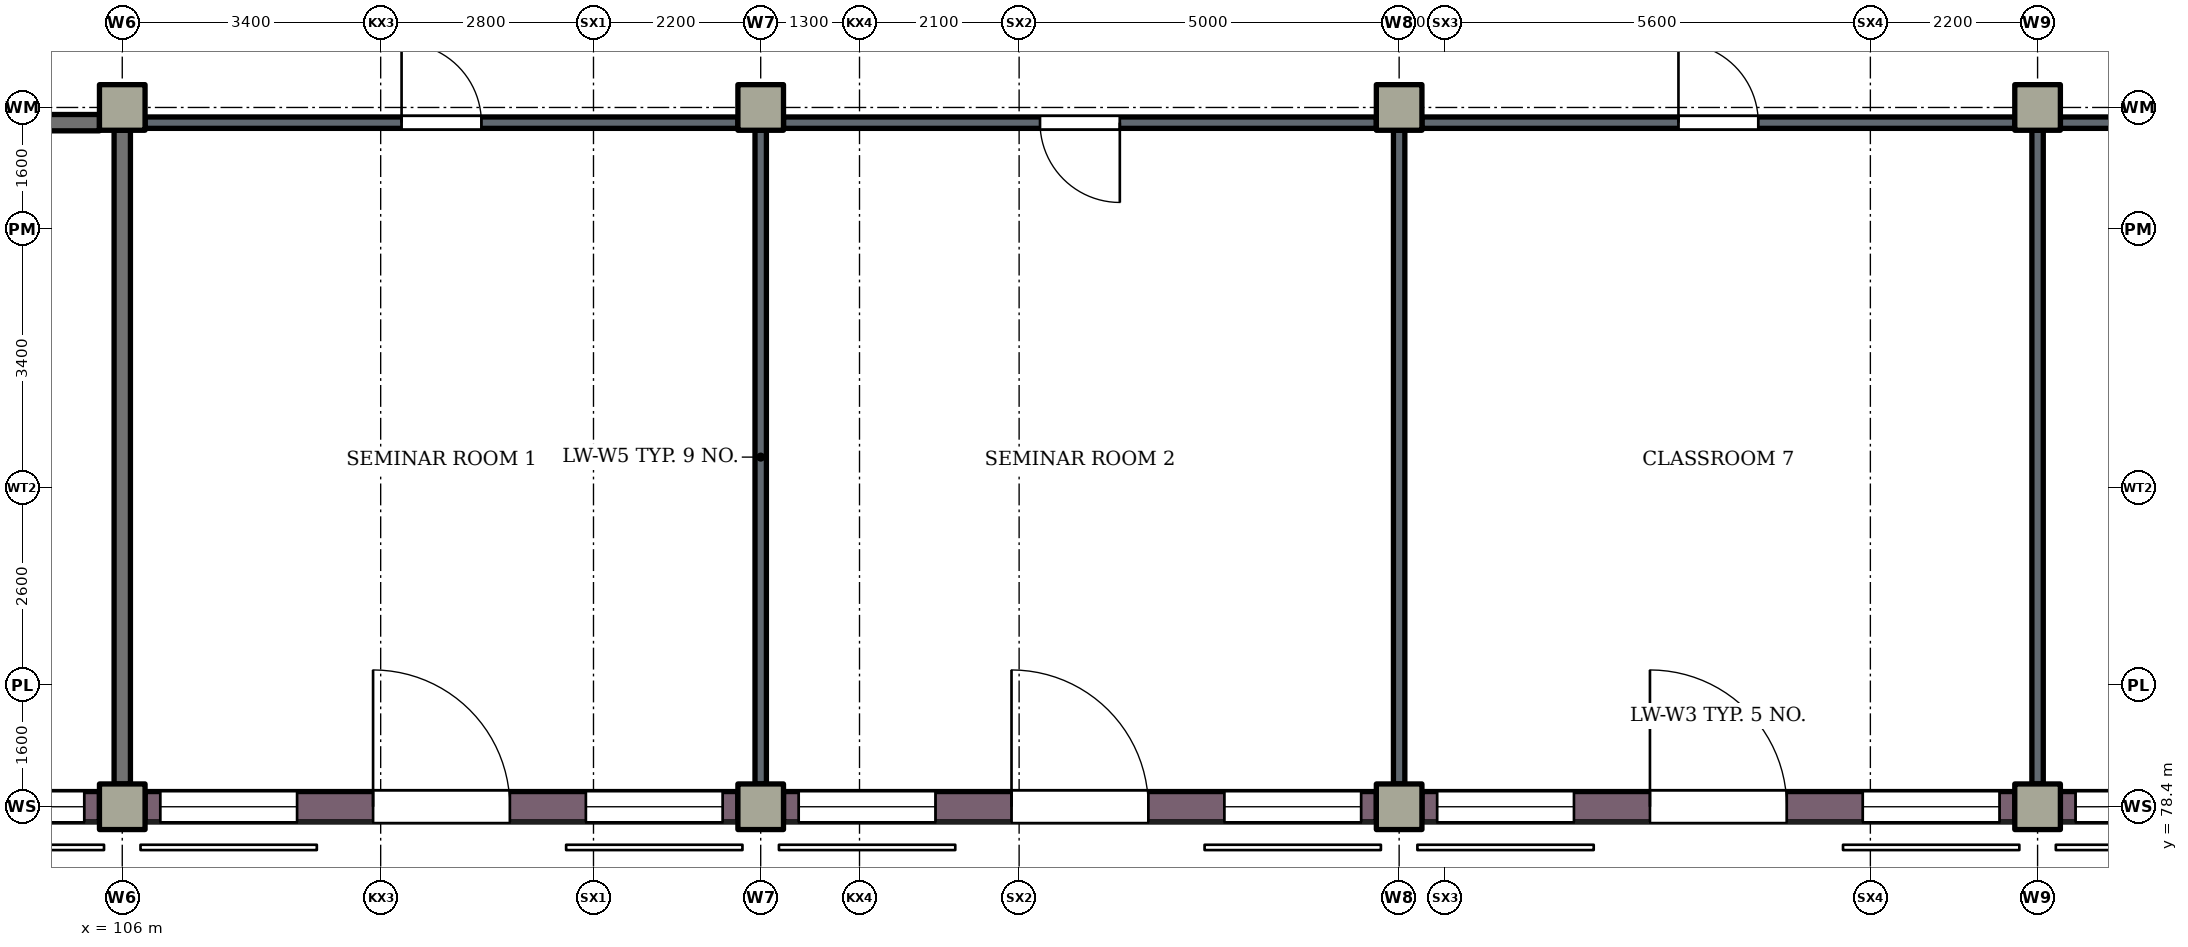
"""IFC4 building model, lengths in metres.
Left out: names, types, materials, properties, quantities, classifications, styles, units other than length and angle.
Written with IfcOpenShell. Run it as: python <this file> out.ifc"""

import sys

from ifc_helpers import new_model, si_unit, direction, frame, frame_2d, origin, origin_2d, place, context, subcontext, project, spatial, rectangle, extrude, element, fill, save


model = new_model("IFC4")
c1 = context("Model", 3, precision=1e-05, world=origin(), true_north=direction((0.0, 1.0)))
c2 = subcontext(c1, "Body", "Model", "MODEL_VIEW")
j1 = project(units=[si_unit("LENGTHUNIT", "METRE"), si_unit("PLANEANGLEUNIT", "RADIAN")], contexts=[c1])
p1 = place(None, origin())
s1 = spatial("IfcSite", under=j1, at=p1, CompositionType="ELEMENT")
p2 = place(p1, origin())
s2 = spatial("IfcBuilding", under=s1, at=p2, CompositionType="ELEMENT")
p3 = place(p2, frame((0.0, 0.0, 8.4)))
s3 = spatial("IfcBuildingStorey", under=s2, at=p3, CompositionType="ELEMENT", Elevation=8.4)
for number, where, z_axis, x_axis in (
    (1, (106.0, 87.6, 0.0), (0.0, 0.0, 1.0), (1.0, 0.0, 0.0)),
    (2, (114.4, 87.6, 0.0), (0.0, 0.0, 1.0), (1.0, 0.0, 0.0)),
    (3, (122.8, 87.6, 0.0), (0.0, 0.0, 1.0), (1.0, 0.0, 0.0)),
    (4, (131.2, 87.6, 0.0), (0.0, 0.0, 1.0), (1.0, 0.0, 0.0)),
    (5, (106.0, 78.4, 0.0), (0.0, 0.0, 1.0), (1.0, 0.0, 0.0)),
    (6, (114.4, 78.4, 0.0), (0.0, 0.0, 1.0), (1.0, 0.0, 0.0)),
    (7, (122.8, 78.4, 0.0), (0.0, 0.0, 1.0), (1.0, 0.0, 0.0)),
    (8, (131.2, 78.4, 0.0), (0.0, 0.0, 1.0), (1.0, 0.0, 0.0)),
):
    element("IfcColumn", number, at=place(p3, frame(where, z_axis=z_axis, x_axis=x_axis)), inside=s3, PredefinedType="COLUMN", context=c2, shape_type="SweptSolid", body=[
        extrude(rectangle(XDim=0.6, YDim=0.6, at=origin_2d()), origin(), (0.0, 0.0, 1.0), 4.2),
    ])
p4 = place(p3, frame((97.9, 78.4, 0.0), z_axis=(0.0, 0.0, 1.0), x_axis=(1.0, 0.0, 0.0)))
e9 = element("IfcWall", 9, at=p4, inside=s3, PredefinedType="SOLIDWALL", context=c2, shape_type="SweptSolid", body=[
    extrude(rectangle(XDim=7.8, YDim=0.4, at=frame_2d((3.9, 0.0))), origin(), (0.0, 0.0, 1.0), 3.32),
])
p5 = place(p4, frame((3.0, 0.0, 0.0)))
e10 = element("IfcOpeningElement", 10, at=p5, cuts=e9, PredefinedType="OPENING", context=c2, shape_type="SweptSolid", body=[
    extrude(rectangle(XDim=1.8, YDim=2.4, at=frame_2d((0.9, 1.2))), frame((0.0, 0.21, 0.0), z_axis=(0.0, -1.0, 0.0), x_axis=(1.0, 0.0, 0.0)), (0.0, 0.0, 1.0), 0.42),
])
p6 = place(p4, frame((0.2, 0.0, 0.9)))
e11 = element("IfcOpeningElement", 11, at=p6, cuts=e9, PredefinedType="OPENING", context=c2, shape_type="SweptSolid", body=[
    extrude(rectangle(XDim=1.8, YDim=1.9, at=frame_2d((0.9, 0.95))), frame((0.0, 0.21, 0.0), z_axis=(0.0, -1.0, 0.0), x_axis=(1.0, 0.0, 0.0)), (0.0, 0.0, 1.0), 0.42),
])
p7 = place(p4, frame((5.8, 0.0, 0.9)))
e12 = element("IfcOpeningElement", 12, at=p7, cuts=e9, PredefinedType="OPENING", context=c2, shape_type="SweptSolid", body=[
    extrude(rectangle(XDim=1.8, YDim=1.9, at=frame_2d((0.9, 0.95))), frame((0.0, 0.21, 0.0), z_axis=(0.0, -1.0, 0.0), x_axis=(1.0, 0.0, 0.0)), (0.0, 0.0, 1.0), 0.42),
])
p8 = place(p3, frame((106.3, 78.4, 0.0), z_axis=(0.0, 0.0, 1.0), x_axis=(1.0, 0.0, 0.0)))
e13 = element("IfcWall", 13, at=p8, inside=s3, PredefinedType="SOLIDWALL", context=c2, shape_type="SweptSolid", body=[
    extrude(rectangle(XDim=7.8, YDim=0.4, at=frame_2d((3.9, 0.0))), origin(), (0.0, 0.0, 1.0), 3.32),
])
p9 = place(p8, frame((3.0, 0.0, 0.0)))
e14 = element("IfcOpeningElement", 14, at=p9, cuts=e13, PredefinedType="OPENING", context=c2, shape_type="SweptSolid", body=[
    extrude(rectangle(XDim=1.8, YDim=2.4, at=frame_2d((0.9, 1.2))), frame((0.0, 0.21, 0.0), z_axis=(0.0, -1.0, 0.0), x_axis=(1.0, 0.0, 0.0)), (0.0, 0.0, 1.0), 0.42),
])
p10 = place(p8, frame((0.2, 0.0, 0.9)))
e15 = element("IfcOpeningElement", 15, at=p10, cuts=e13, PredefinedType="OPENING", context=c2, shape_type="SweptSolid", body=[
    extrude(rectangle(XDim=1.8, YDim=1.9, at=frame_2d((0.9, 0.95))), frame((0.0, 0.21, 0.0), z_axis=(0.0, -1.0, 0.0), x_axis=(1.0, 0.0, 0.0)), (0.0, 0.0, 1.0), 0.42),
])
p11 = place(p8, frame((5.8, 0.0, 0.9)))
e16 = element("IfcOpeningElement", 16, at=p11, cuts=e13, PredefinedType="OPENING", context=c2, shape_type="SweptSolid", body=[
    extrude(rectangle(XDim=1.8, YDim=1.9, at=frame_2d((0.9, 0.95))), frame((0.0, 0.21, 0.0), z_axis=(0.0, -1.0, 0.0), x_axis=(1.0, 0.0, 0.0)), (0.0, 0.0, 1.0), 0.42),
])
p12 = place(p3, frame((114.7, 78.4, 0.0), z_axis=(0.0, 0.0, 1.0), x_axis=(1.0, 0.0, 0.0)))
e17 = element("IfcWall", 17, at=p12, inside=s3, PredefinedType="SOLIDWALL", context=c2, shape_type="SweptSolid", body=[
    extrude(rectangle(XDim=7.8, YDim=0.4, at=frame_2d((3.9, 0.0))), origin(), (0.0, 0.0, 1.0), 3.32),
])
p13 = place(p12, frame((3.0, 0.0, 0.0)))
e18 = element("IfcOpeningElement", 18, at=p13, cuts=e17, PredefinedType="OPENING", context=c2, shape_type="SweptSolid", body=[
    extrude(rectangle(XDim=1.8, YDim=2.4, at=frame_2d((0.9, 1.2))), frame((0.0, 0.21, 0.0), z_axis=(0.0, -1.0, 0.0), x_axis=(1.0, 0.0, 0.0)), (0.0, 0.0, 1.0), 0.42),
])
p14 = place(p12, frame((0.2, 0.0, 0.9)))
e19 = element("IfcOpeningElement", 19, at=p14, cuts=e17, PredefinedType="OPENING", context=c2, shape_type="SweptSolid", body=[
    extrude(rectangle(XDim=1.8, YDim=1.9, at=frame_2d((0.9, 0.95))), frame((0.0, 0.21, 0.0), z_axis=(0.0, -1.0, 0.0), x_axis=(1.0, 0.0, 0.0)), (0.0, 0.0, 1.0), 0.42),
])
p15 = place(p12, frame((5.8, 0.0, 0.9)))
e20 = element("IfcOpeningElement", 20, at=p15, cuts=e17, PredefinedType="OPENING", context=c2, shape_type="SweptSolid", body=[
    extrude(rectangle(XDim=1.8, YDim=1.9, at=frame_2d((0.9, 0.95))), frame((0.0, 0.21, 0.0), z_axis=(0.0, -1.0, 0.0), x_axis=(1.0, 0.0, 0.0)), (0.0, 0.0, 1.0), 0.42),
])
p16 = place(p3, frame((123.1, 78.4, 0.0), z_axis=(0.0, 0.0, 1.0), x_axis=(1.0, 0.0, 0.0)))
e21 = element("IfcWall", 21, at=p16, inside=s3, PredefinedType="SOLIDWALL", context=c2, shape_type="SweptSolid", body=[
    extrude(rectangle(XDim=7.8, YDim=0.4, at=frame_2d((3.9, 0.0))), origin(), (0.0, 0.0, 1.0), 3.32),
])
p17 = place(p16, frame((3.0, 0.0, 0.0)))
e22 = element("IfcOpeningElement", 22, at=p17, cuts=e21, PredefinedType="OPENING", context=c2, shape_type="SweptSolid", body=[
    extrude(rectangle(XDim=1.8, YDim=2.4, at=frame_2d((0.9, 1.2))), frame((0.0, 0.21, 0.0), z_axis=(0.0, -1.0, 0.0), x_axis=(1.0, 0.0, 0.0)), (0.0, 0.0, 1.0), 0.42),
])
p18 = place(p16, frame((0.2, 0.0, 0.9)))
e23 = element("IfcOpeningElement", 23, at=p18, cuts=e21, PredefinedType="OPENING", context=c2, shape_type="SweptSolid", body=[
    extrude(rectangle(XDim=1.8, YDim=1.9, at=frame_2d((0.9, 0.95))), frame((0.0, 0.21, 0.0), z_axis=(0.0, -1.0, 0.0), x_axis=(1.0, 0.0, 0.0)), (0.0, 0.0, 1.0), 0.42),
])
p19 = place(p16, frame((5.8, 0.0, 0.9)))
e24 = element("IfcOpeningElement", 24, at=p19, cuts=e21, PredefinedType="OPENING", context=c2, shape_type="SweptSolid", body=[
    extrude(rectangle(XDim=1.8, YDim=1.9, at=frame_2d((0.9, 0.95))), frame((0.0, 0.21, 0.0), z_axis=(0.0, -1.0, 0.0), x_axis=(1.0, 0.0, 0.0)), (0.0, 0.0, 1.0), 0.42),
])
p20 = place(p3, frame((131.5, 78.4, 0.0), z_axis=(0.0, 0.0, 1.0), x_axis=(1.0, 0.0, 0.0)))
e25 = element("IfcWall", 25, at=p20, inside=s3, PredefinedType="SOLIDWALL", context=c2, shape_type="SweptSolid", body=[
    extrude(rectangle(XDim=7.8, YDim=0.4, at=frame_2d((3.9, 0.0))), origin(), (0.0, 0.0, 1.0), 3.32),
])
p21 = place(p20, frame((3.0, 0.0, 0.0)))
e26 = element("IfcOpeningElement", 26, at=p21, cuts=e25, PredefinedType="OPENING", context=c2, shape_type="SweptSolid", body=[
    extrude(rectangle(XDim=1.8, YDim=2.4, at=frame_2d((0.9, 1.2))), frame((0.0, 0.21, 0.0), z_axis=(0.0, -1.0, 0.0), x_axis=(1.0, 0.0, 0.0)), (0.0, 0.0, 1.0), 0.42),
])
p22 = place(p20, frame((0.2, 0.0, 0.9)))
e27 = element("IfcOpeningElement", 27, at=p22, cuts=e25, PredefinedType="OPENING", context=c2, shape_type="SweptSolid", body=[
    extrude(rectangle(XDim=1.8, YDim=1.9, at=frame_2d((0.9, 0.95))), frame((0.0, 0.21, 0.0), z_axis=(0.0, -1.0, 0.0), x_axis=(1.0, 0.0, 0.0)), (0.0, 0.0, 1.0), 0.42),
])
p23 = place(p20, frame((5.8, 0.0, 0.9)))
e28 = element("IfcOpeningElement", 28, at=p23, cuts=e25, PredefinedType="OPENING", context=c2, shape_type="SweptSolid", body=[
    extrude(rectangle(XDim=1.8, YDim=1.9, at=frame_2d((0.9, 0.95))), frame((0.0, 0.21, 0.0), z_axis=(0.0, -1.0, 0.0), x_axis=(1.0, 0.0, 0.0)), (0.0, 0.0, 1.0), 0.42),
])
p24 = place(p3, frame((97.9, 87.4, 0.0), z_axis=(0.0, 0.0, 1.0), x_axis=(1.0, 0.0, 0.0)))
e29 = element("IfcWall", 29, at=p24, inside=s3, PredefinedType="PARTITIONING", context=c2, shape_type="SweptSolid", body=[
    extrude(rectangle(XDim=7.8, YDim=0.215, at=frame_2d((3.9, 0.0))), origin(), (0.0, 0.0, 1.0), 3.12),
])
p25 = place(p24, frame((3.375, 0.0, 0.0)))
e30 = element("IfcOpeningElement", 30, at=p25, cuts=e29, PredefinedType="OPENING", context=c2, shape_type="SweptSolid", body=[
    extrude(rectangle(XDim=1.05, YDim=2.1, at=frame_2d((0.525, 1.05))), frame((0.0, 0.117, 0.0), z_axis=(0.0, -1.0, 0.0), x_axis=(1.0, 0.0, 0.0)), (0.0, 0.0, 1.0), 0.235),
])
p26 = place(p3, frame((106.3, 87.4, 0.0), z_axis=(0.0, 0.0, 1.0), x_axis=(1.0, 0.0, 0.0)))
e31 = element("IfcWall", 31, at=p26, inside=s3, PredefinedType="PARTITIONING", context=c2, shape_type="SweptSolid", body=[
    extrude(rectangle(XDim=7.8, YDim=0.15, at=frame_2d((3.9, 0.0))), origin(), (0.0, 0.0, 1.0), 3.12),
])
p27 = place(p26, frame((3.375, 0.0, 0.0)))
e32 = element("IfcOpeningElement", 32, at=p27, cuts=e31, PredefinedType="OPENING", context=c2, shape_type="SweptSolid", body=[
    extrude(rectangle(XDim=1.05, YDim=2.1, at=frame_2d((0.525, 1.05))), frame((0.0, 0.085, 0.0), z_axis=(0.0, -1.0, 0.0), x_axis=(1.0, 0.0, 0.0)), (0.0, 0.0, 1.0), 0.17),
])
p28 = place(p3, frame((114.7, 87.4, 0.0), z_axis=(0.0, 0.0, 1.0), x_axis=(1.0, 0.0, 0.0)))
e33 = element("IfcWall", 33, at=p28, inside=s3, PredefinedType="PARTITIONING", context=c2, shape_type="SweptSolid", body=[
    extrude(rectangle(XDim=7.8, YDim=0.15, at=frame_2d((3.9, 0.0))), origin(), (0.0, 0.0, 1.0), 3.12),
])
p29 = place(p28, frame((3.375, 0.0, 0.0)))
e34 = element("IfcOpeningElement", 34, at=p29, cuts=e33, PredefinedType="OPENING", context=c2, shape_type="SweptSolid", body=[
    extrude(rectangle(XDim=1.05, YDim=2.1, at=frame_2d((0.525, 1.05))), frame((0.0, 0.085, 0.0), z_axis=(0.0, -1.0, 0.0), x_axis=(1.0, 0.0, 0.0)), (0.0, 0.0, 1.0), 0.17),
])
p30 = place(p3, frame((123.1, 87.4, 0.0), z_axis=(0.0, 0.0, 1.0), x_axis=(1.0, 0.0, 0.0)))
e35 = element("IfcWall", 35, at=p30, inside=s3, PredefinedType="PARTITIONING", context=c2, shape_type="SweptSolid", body=[
    extrude(rectangle(XDim=7.8, YDim=0.15, at=frame_2d((3.9, 0.0))), origin(), (0.0, 0.0, 1.0), 3.12),
])
p31 = place(p30, frame((3.375, 0.0, 0.0)))
e36 = element("IfcOpeningElement", 36, at=p31, cuts=e35, PredefinedType="OPENING", context=c2, shape_type="SweptSolid", body=[
    extrude(rectangle(XDim=1.05, YDim=2.1, at=frame_2d((0.525, 1.05))), frame((0.0, 0.085, 0.0), z_axis=(0.0, -1.0, 0.0), x_axis=(1.0, 0.0, 0.0)), (0.0, 0.0, 1.0), 0.17),
])
p32 = place(p3, frame((131.5, 87.4, 0.0), z_axis=(0.0, 0.0, 1.0), x_axis=(1.0, 0.0, 0.0)))
e37 = element("IfcWall", 37, at=p32, inside=s3, PredefinedType="PARTITIONING", context=c2, shape_type="SweptSolid", body=[
    extrude(rectangle(XDim=7.75, YDim=0.15, at=frame_2d((3.875, 0.0))), origin(), (0.0, 0.0, 1.0), 3.12),
])
p33 = place(p32, frame((3.375, 0.0, 0.0)))
e38 = element("IfcOpeningElement", 38, at=p33, cuts=e37, PredefinedType="OPENING", context=c2, shape_type="SweptSolid", body=[
    extrude(rectangle(XDim=1.05, YDim=2.1, at=frame_2d((0.525, 1.05))), frame((0.0, 0.085, 0.0), z_axis=(0.0, -1.0, 0.0), x_axis=(1.0, 0.0, 0.0)), (0.0, 0.0, 1.0), 0.17),
])
p34 = place(p3, frame((106.0, 78.7, 0.0), z_axis=(0.0, 0.0, 1.0), x_axis=(0.0, 1.0, 0.0)))
e39 = element("IfcWall", 39, at=p34, inside=s3, PredefinedType="PARTITIONING", context=c2, shape_type="SweptSolid", body=[
    extrude(rectangle(XDim=8.6, YDim=0.215, at=frame_2d((4.3, 0.0))), origin(), (0.0, 0.0, 1.0), 3.02),
])
for number, where, z_axis, x_axis in (
    (40, (114.4, 78.7, 0.0), (0.0, 0.0, 1.0), (0.0, 1.0, 0.0)),
    (41, (122.8, 78.7, 0.0), (0.0, 0.0, 1.0), (0.0, 1.0, 0.0)),
    (42, (131.2, 78.7, 0.0), (0.0, 0.0, 1.0), (0.0, 1.0, 0.0)),
):
    element("IfcWall", number, at=place(p3, frame(where, z_axis=z_axis, x_axis=x_axis)), inside=s3, PredefinedType="PARTITIONING", context=c2, shape_type="SweptSolid", body=[
        extrude(rectangle(XDim=8.6, YDim=0.15, at=frame_2d((4.3, 0.0))), origin(), (0.0, 0.0, 1.0), 3.02),
    ])
p35 = place(p7, origin())
e43 = element("IfcWindow", 43, at=p35, inside=s3, PartitioningType="SINGLE_PANEL", PredefinedType="WINDOW", context=c2, shape_type="SweptSolid", body=[
    extrude(rectangle(XDim=1.8, YDim=1.9, at=frame_2d((0.9, 0.95))), frame((0.0, 0.03, 0.0), z_axis=(0.0, -1.0, 0.0), x_axis=(1.0, 0.0, 0.0)), (0.0, 0.0, 1.0), 0.06),
])
fill(e12, e43)
p36 = place(p9, origin())
e44 = element("IfcDoor", 44, at=p36, inside=s3, OperationType="DOUBLE_DOOR_SINGLE_SWING", PredefinedType="DOOR", context=c2, shape_type="SweptSolid", body=[
    extrude(rectangle(XDim=1.8, YDim=2.4, at=frame_2d((0.9, 1.2))), frame((0.0, 0.025, 0.0), z_axis=(0.0, -1.0, 0.0), x_axis=(1.0, 0.0, 0.0)), (0.0, 0.0, 1.0), 0.05),
])
fill(e14, e44)
p37 = place(p10, origin())
e45 = element("IfcWindow", 45, at=p37, inside=s3, PartitioningType="SINGLE_PANEL", PredefinedType="WINDOW", context=c2, shape_type="SweptSolid", body=[
    extrude(rectangle(XDim=1.8, YDim=1.9, at=frame_2d((0.9, 0.95))), frame((0.0, 0.03, 0.0), z_axis=(0.0, -1.0, 0.0), x_axis=(1.0, 0.0, 0.0)), (0.0, 0.0, 1.0), 0.06),
])
fill(e15, e45)
p38 = place(p11, origin())
e46 = element("IfcWindow", 46, at=p38, inside=s3, PartitioningType="SINGLE_PANEL", PredefinedType="WINDOW", context=c2, shape_type="SweptSolid", body=[
    extrude(rectangle(XDim=1.8, YDim=1.9, at=frame_2d((0.9, 0.95))), frame((0.0, 0.03, 0.0), z_axis=(0.0, -1.0, 0.0), x_axis=(1.0, 0.0, 0.0)), (0.0, 0.0, 1.0), 0.06),
])
fill(e16, e46)
p39 = place(p13, origin())
e47 = element("IfcDoor", 47, at=p39, inside=s3, OperationType="DOUBLE_DOOR_SINGLE_SWING", PredefinedType="DOOR", context=c2, shape_type="SweptSolid", body=[
    extrude(rectangle(XDim=1.8, YDim=2.4, at=frame_2d((0.9, 1.2))), frame((0.0, 0.025, 0.0), z_axis=(0.0, -1.0, 0.0), x_axis=(1.0, 0.0, 0.0)), (0.0, 0.0, 1.0), 0.05),
])
fill(e18, e47)
p40 = place(p14, origin())
e48 = element("IfcWindow", 48, at=p40, inside=s3, PartitioningType="SINGLE_PANEL", PredefinedType="WINDOW", context=c2, shape_type="SweptSolid", body=[
    extrude(rectangle(XDim=1.8, YDim=1.9, at=frame_2d((0.9, 0.95))), frame((0.0, 0.03, 0.0), z_axis=(0.0, -1.0, 0.0), x_axis=(1.0, 0.0, 0.0)), (0.0, 0.0, 1.0), 0.06),
])
fill(e19, e48)
p41 = place(p15, origin())
e49 = element("IfcWindow", 49, at=p41, inside=s3, PartitioningType="SINGLE_PANEL", PredefinedType="WINDOW", context=c2, shape_type="SweptSolid", body=[
    extrude(rectangle(XDim=1.8, YDim=1.9, at=frame_2d((0.9, 0.95))), frame((0.0, 0.03, 0.0), z_axis=(0.0, -1.0, 0.0), x_axis=(1.0, 0.0, 0.0)), (0.0, 0.0, 1.0), 0.06),
])
fill(e20, e49)
p42 = place(p17, origin())
e50 = element("IfcDoor", 50, at=p42, inside=s3, OperationType="DOUBLE_DOOR_SINGLE_SWING", PredefinedType="DOOR", context=c2, shape_type="SweptSolid", body=[
    extrude(rectangle(XDim=1.8, YDim=2.4, at=frame_2d((0.9, 1.2))), frame((0.0, 0.025, 0.0), z_axis=(0.0, -1.0, 0.0), x_axis=(1.0, 0.0, 0.0)), (0.0, 0.0, 1.0), 0.05),
])
fill(e22, e50)
p43 = place(p18, origin())
e51 = element("IfcWindow", 51, at=p43, inside=s3, PartitioningType="SINGLE_PANEL", PredefinedType="WINDOW", context=c2, shape_type="SweptSolid", body=[
    extrude(rectangle(XDim=1.8, YDim=1.9, at=frame_2d((0.9, 0.95))), frame((0.0, 0.03, 0.0), z_axis=(0.0, -1.0, 0.0), x_axis=(1.0, 0.0, 0.0)), (0.0, 0.0, 1.0), 0.06),
])
fill(e23, e51)
p44 = place(p19, origin())
e52 = element("IfcWindow", 52, at=p44, inside=s3, PartitioningType="SINGLE_PANEL", PredefinedType="WINDOW", context=c2, shape_type="SweptSolid", body=[
    extrude(rectangle(XDim=1.8, YDim=1.9, at=frame_2d((0.9, 0.95))), frame((0.0, 0.03, 0.0), z_axis=(0.0, -1.0, 0.0), x_axis=(1.0, 0.0, 0.0)), (0.0, 0.0, 1.0), 0.06),
])
fill(e24, e52)
p45 = place(p22, origin())
e53 = element("IfcWindow", 53, at=p45, inside=s3, PartitioningType="SINGLE_PANEL", PredefinedType="WINDOW", context=c2, shape_type="SweptSolid", body=[
    extrude(rectangle(XDim=1.8, YDim=1.9, at=frame_2d((0.9, 0.95))), frame((0.0, 0.03, 0.0), z_axis=(0.0, -1.0, 0.0), x_axis=(1.0, 0.0, 0.0)), (0.0, 0.0, 1.0), 0.06),
])
fill(e27, e53)
p46 = place(p27, origin())
e54 = element("IfcDoor", 54, at=p46, inside=s3, OperationType="SINGLE_SWING_LEFT", PredefinedType="DOOR", context=c2, shape_type="SweptSolid", body=[
    extrude(rectangle(XDim=1.05, YDim=2.1, at=frame_2d((0.525, 1.05))), frame((0.0, 0.025, 0.0), z_axis=(0.0, -1.0, 0.0), x_axis=(1.0, 0.0, 0.0)), (0.0, 0.0, 1.0), 0.05),
])
fill(e32, e54)
p47 = place(p29, origin())
e55 = element("IfcDoor", 55, at=p47, inside=s3, OperationType="SINGLE_SWING_RIGHT", PredefinedType="DOOR", context=c2, shape_type="SweptSolid", body=[
    extrude(rectangle(XDim=1.05, YDim=2.1, at=frame_2d((0.525, 1.05))), frame((0.0, 0.025, 0.0), z_axis=(0.0, -1.0, 0.0), x_axis=(1.0, 0.0, 0.0)), (0.0, 0.0, 1.0), 0.05),
])
fill(e34, e55)
p48 = place(p31, origin())
e56 = element("IfcDoor", 56, at=p48, inside=s3, OperationType="SINGLE_SWING_LEFT", PredefinedType="DOOR", context=c2, shape_type="SweptSolid", body=[
    extrude(rectangle(XDim=1.05, YDim=2.1, at=frame_2d((0.525, 1.05))), frame((0.0, 0.025, 0.0), z_axis=(0.0, -1.0, 0.0), x_axis=(1.0, 0.0, 0.0)), (0.0, 0.0, 1.0), 0.05),
])
fill(e36, e56)
save(model, sys.argv[1])
